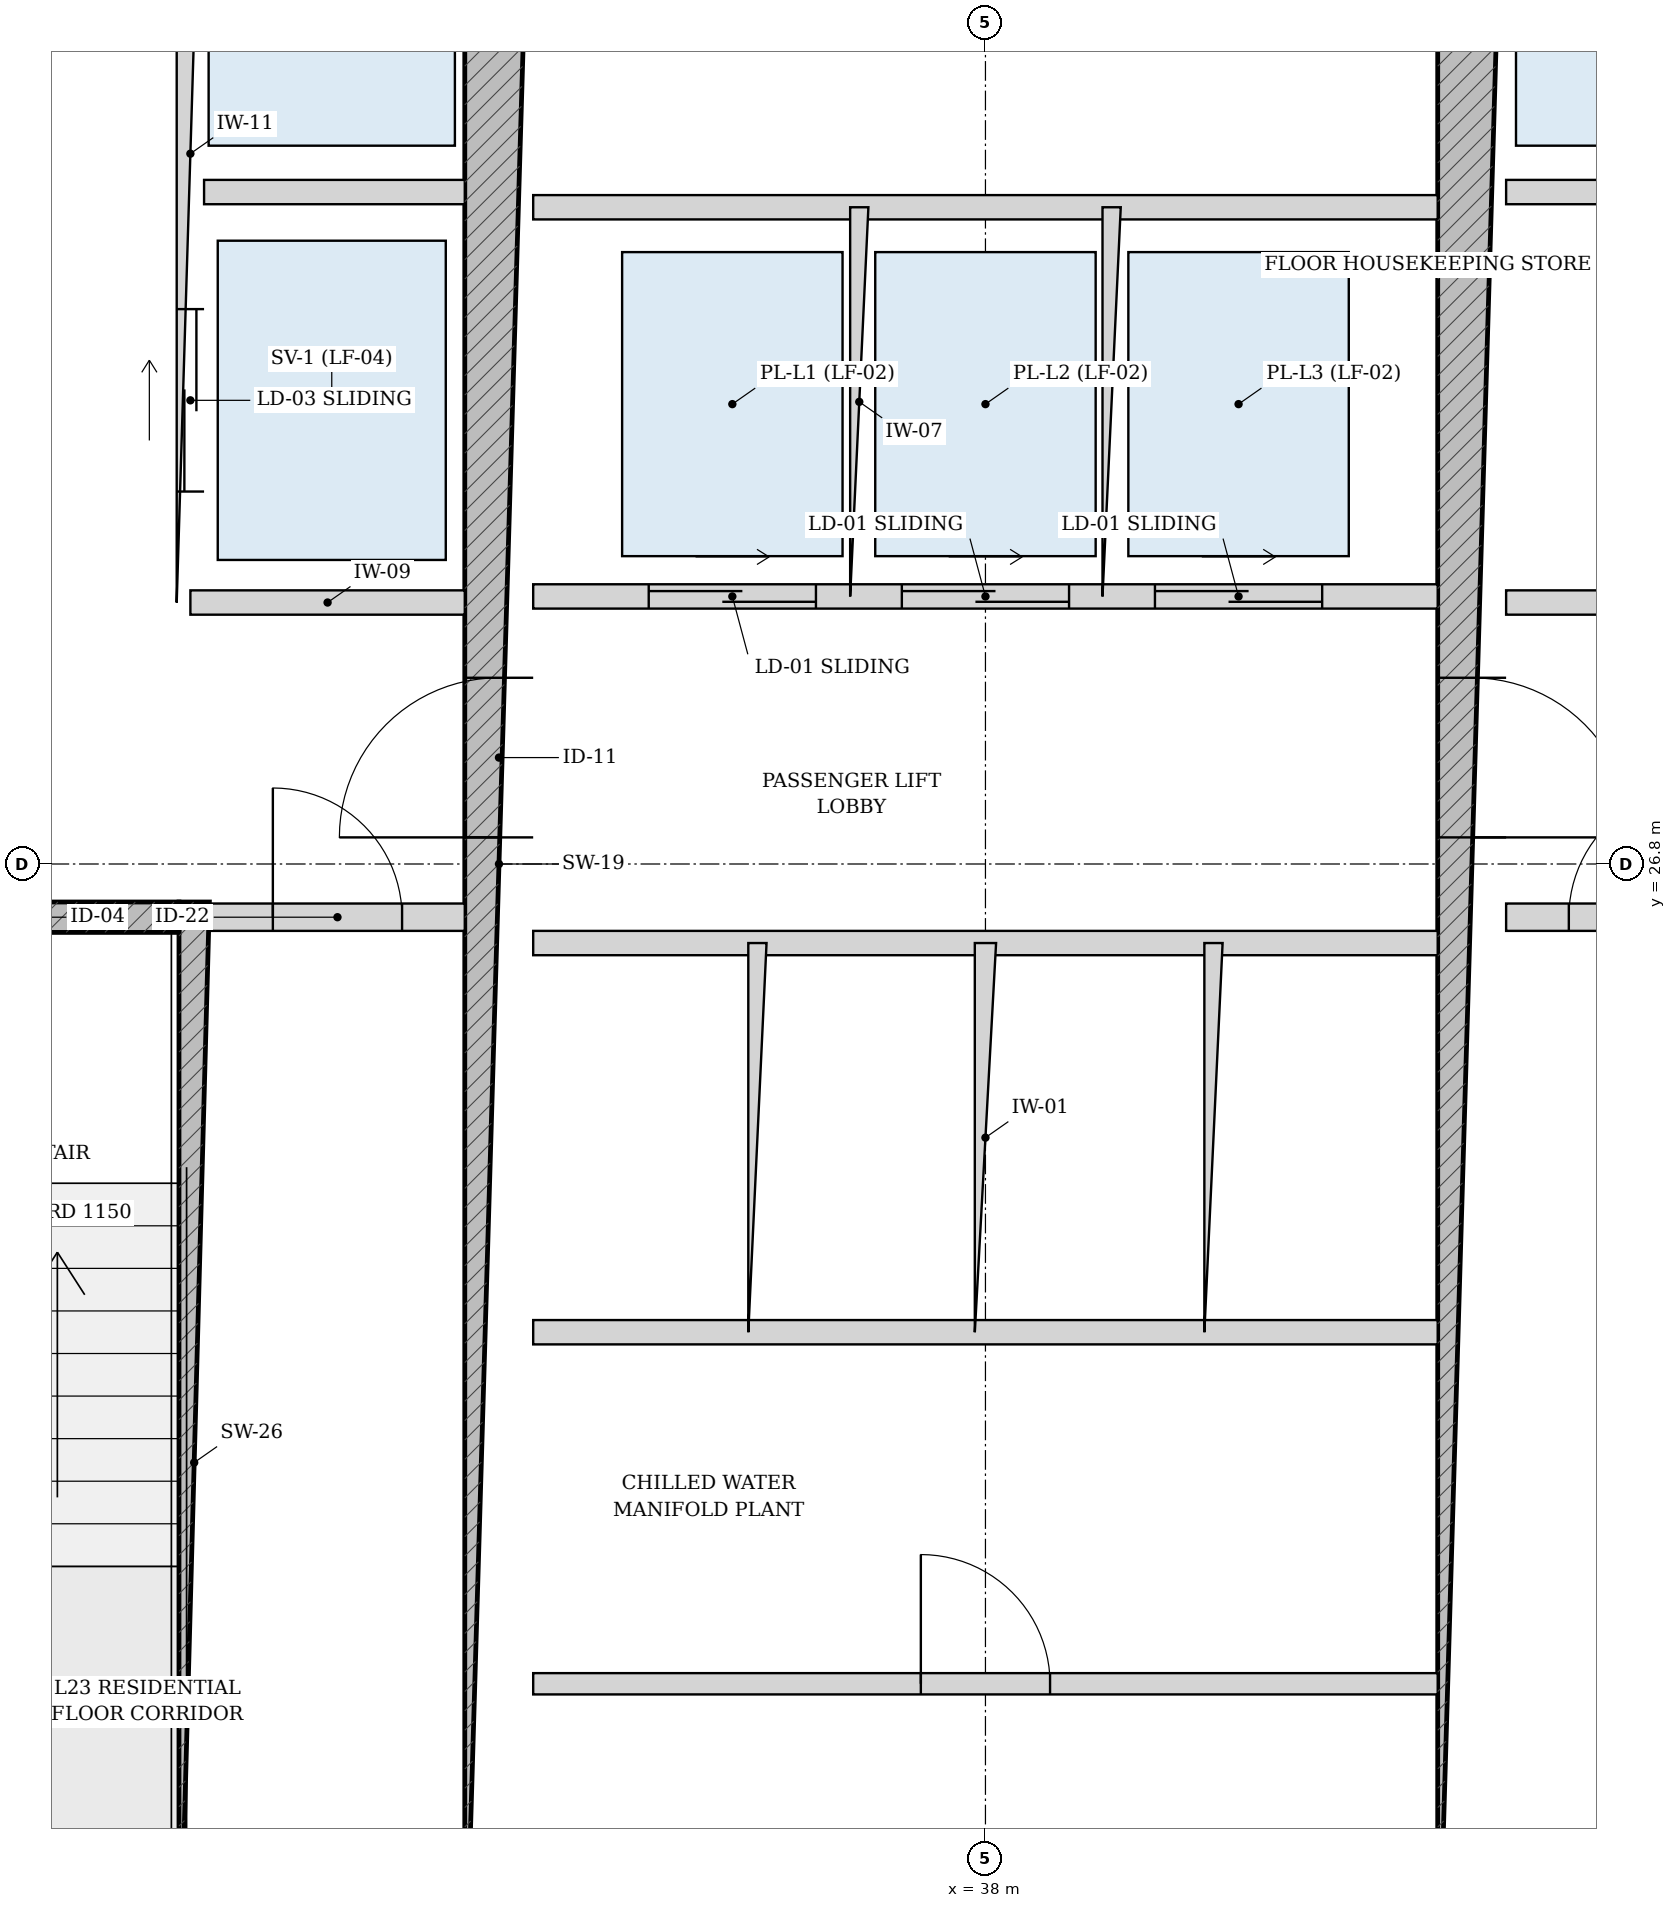
"""IFC4 building model, lengths in metres.
Left out: names, types, materials, properties, quantities, classifications, styles, units other than length and angle.
Written with IfcOpenShell. Run it as: python <this file> out.ifc"""

import sys

from ifc_helpers import new_model, si_unit, direction, frame, frame_2d, origin, place, context, subcontext, project, spatial, rectangle, extrude, source, transform, mapped, element, fill, save


model = new_model("IFC4")
c1 = context("Model", 3, precision=1e-05, world=origin(), true_north=direction((-0.2419218956, 0.970295726276)))
c2 = subcontext(c1, "Body", "Model", "MODEL_VIEW")
j1 = project(units=[si_unit("LENGTHUNIT", "METRE"), si_unit("PLANEANGLEUNIT", "RADIAN")], contexts=[c1])
p1 = place(None, origin())
s1 = spatial("IfcSite", under=j1, at=p1, CompositionType="ELEMENT")
p2 = place(p1, origin())
s2 = spatial("IfcBuilding", under=s1, at=p2, CompositionType="ELEMENT")
p3 = place(p2, frame((0.0, 0.0, 90.6)))
s3 = spatial("IfcBuildingStorey", under=s2, at=p3, CompositionType="ELEMENT", Elevation=90.6)
p4 = place(p3, frame((32.795, 19.175, 0.0), z_axis=(0.0, 0.0, 1.0), x_axis=(0.0, 1.0, 0.0)))
e1 = element("IfcWall", 1, at=p4, inside=s3, PredefinedType="SOLIDWALL", context=c2, shape_type="SweptSolid", body=[
    extrude(rectangle(XDim=7.375, YDim=0.2, at=frame_2d((3.688, 0.0))), origin(), (0.0, 0.0, 1.0), 3.325),
])
p5 = place(p3, frame((29.375, 26.45, 0.0), z_axis=(0.0, 0.0, 1.0), x_axis=(1.0, 0.0, 0.0)))
e2 = element("IfcWall", 2, at=p5, inside=s3, PredefinedType="SOLIDWALL", context=c2, shape_type="SweptSolid", body=[
    extrude(rectangle(XDim=3.32, YDim=0.2, at=frame_2d((1.66, 0.0))), origin(), (0.0, 0.0, 1.0), 3.325),
])
p6 = place(p5, frame((1.185, 0.0, 0.0)))
e3 = element("IfcOpeningElement", 3, at=p6, cuts=e2, PredefinedType="OPENING", context=c2, shape_type="SweptSolid", body=[
    extrude(rectangle(XDim=0.95, YDim=2.15, at=frame_2d((0.475, 1.075))), frame((0.0, 0.11, 0.0), z_axis=(0.0, -1.0, 0.0), x_axis=(1.0, 0.0, 0.0)), (0.0, 0.0, 1.0), 0.22),
])
p7 = place(p3, frame((34.8, 19.175, 0.0), z_axis=(0.0, 0.0, 1.0), x_axis=(0.0, 1.0, 0.0)))
e4 = element("IfcWall", 4, at=p7, inside=s3, PredefinedType="SHEAR", context=c2, shape_type="SweptSolid", body=[
    extrude(rectangle(XDim=15.25, YDim=0.45, at=frame_2d((7.625, 0.0))), origin(), (0.0, 0.0, 1.0), 3.325),
])
p8 = place(p7, frame((7.8, 0.0, 0.0)))
e5 = element("IfcOpeningElement", 5, at=p8, cuts=e4, PredefinedType="OPENING", context=c2, shape_type="SweptSolid", body=[
    extrude(rectangle(XDim=1.05, YDim=2.15, at=frame_2d((0.525, 1.075))), frame((0.0, 0.235, 0.0), z_axis=(0.0, -1.0, 0.0), x_axis=(1.0, 0.0, 0.0)), (0.0, 0.0, 1.0), 0.47),
])
p9 = place(p3, frame((41.2, 19.175, 0.0), z_axis=(0.0, 0.0, 1.0), x_axis=(0.0, 1.0, 0.0)))
e6 = element("IfcWall", 6, at=p9, inside=s3, PredefinedType="SHEAR", context=c2, shape_type="SweptSolid", body=[
    extrude(rectangle(XDim=15.25, YDim=0.45, at=frame_2d((7.625, 0.0))), origin(), (0.0, 0.0, 1.0), 3.325),
])
p10 = place(p9, frame((7.8, 0.0, 0.0)))
e7 = element("IfcOpeningElement", 7, at=p10, cuts=e6, PredefinedType="OPENING", context=c2, shape_type="SweptSolid", body=[
    extrude(rectangle(XDim=1.05, YDim=2.15, at=frame_2d((0.525, 1.075))), frame((0.0, 0.235, 0.0), z_axis=(0.0, -1.0, 0.0), x_axis=(1.0, 0.0, 0.0)), (0.0, 0.0, 1.0), 0.47),
])
p11 = place(p3, frame((32.9, 26.45, 0.0), z_axis=(0.0, 0.0, 1.0), x_axis=(1.0, 0.0, 0.0)))
e8 = element("IfcWall", 8, at=p11, inside=s3, PredefinedType="PARTITIONING", context=c2, shape_type="SweptSolid", body=[
    extrude(rectangle(XDim=1.675, YDim=0.18, at=frame_2d((0.837, 0.0))), origin(), (0.0, 0.0, 1.0), 3.325),
])
p12 = place(p11, frame((0.413, 0.0, 0.0)))
e9 = element("IfcOpeningElement", 9, at=p12, cuts=e8, PredefinedType="OPENING", context=c2, shape_type="SweptSolid", body=[
    extrude(rectangle(XDim=0.85, YDim=2.1, at=frame_2d((0.425, 1.05))), frame((0.0, 0.1, 0.0), z_axis=(0.0, -1.0, 0.0), x_axis=(1.0, 0.0, 0.0)), (0.0, 0.0, 1.0), 0.2),
])
p13 = place(p3, frame((41.425, 26.45, 0.0), z_axis=(0.0, 0.0, 1.0), x_axis=(1.0, 0.0, 0.0)))
e10 = element("IfcWall", 10, at=p13, inside=s3, PredefinedType="PARTITIONING", context=c2, shape_type="SweptSolid", body=[
    extrude(rectangle(XDim=1.675, YDim=0.18, at=frame_2d((0.837, 0.0))), origin(), (0.0, 0.0, 1.0), 3.325),
])
p14 = place(p13, frame((0.413, 0.0, 0.0)))
e11 = element("IfcOpeningElement", 11, at=p14, cuts=e10, PredefinedType="OPENING", context=c2, shape_type="SweptSolid", body=[
    extrude(rectangle(XDim=0.85, YDim=2.1, at=frame_2d((0.425, 1.05))), frame((0.0, 0.1, 0.0), z_axis=(0.0, -1.0, 0.0), x_axis=(1.0, 0.0, 0.0)), (0.0, 0.0, 1.0), 0.2),
])
p15 = place(p3, frame((32.77, 28.52, 0.0), z_axis=(0.0, 0.0, 1.0), x_axis=(0.0, 1.0, 0.0)))
e12 = element("IfcWall", 12, at=p15, inside=s3, PredefinedType="PARTITIONING", context=c2, shape_type="SweptSolid", body=[
    extrude(rectangle(XDim=5.905, YDim=0.18, at=frame_2d((2.953, 0.0))), origin(), (0.0, 0.0, 1.0), 3.325),
])
p16 = place(p15, frame((3.655, 0.0, 0.0)))
e13 = element("IfcOpeningElement", 13, at=p16, cuts=e12, PredefinedType="OPENING", context=c2, shape_type="SweptSolid", body=[
    extrude(rectangle(XDim=1.15, YDim=2.2, at=frame_2d((0.575, 1.1))), frame((0.0, 0.1, 0.0), z_axis=(0.0, -1.0, 0.0), x_axis=(1.0, 0.0, 0.0)), (0.0, 0.0, 1.0), 0.2),
])
p17 = place(p15, frame((0.73, 0.0, 0.0)))
e14 = element("IfcOpeningElement", 14, at=p17, cuts=e12, PredefinedType="OPENING", context=c2, shape_type="SweptSolid", body=[
    extrude(rectangle(XDim=1.2, YDim=2.25, at=frame_2d((0.6, 1.125))), frame((0.0, 0.1, 0.0), z_axis=(0.0, -1.0, 0.0), x_axis=(1.0, 0.0, 0.0)), (0.0, 0.0, 1.0), 0.2),
])
p18 = place(p3, frame((32.86, 31.22, 0.0), z_axis=(0.0, 0.0, 1.0), x_axis=(1.0, 0.0, 0.0)))
e15 = element("IfcWall", 15, at=p18, inside=s3, PredefinedType="PARTITIONING", context=c2, shape_type="SweptSolid", body=[
    extrude(rectangle(XDim=1.715, YDim=0.16, at=frame_2d((0.857, 0.0))), origin(), (0.0, 0.0, 1.0), 3.325),
])
p19 = place(p3, frame((32.77, 28.52, 0.0), z_axis=(0.0, 0.0, 1.0), x_axis=(1.0, 0.0, 0.0)))
e16 = element("IfcWall", 16, at=p19, inside=s3, PredefinedType="PARTITIONING", context=c2, shape_type="SweptSolid", body=[
    extrude(rectangle(XDim=1.805, YDim=0.16, at=frame_2d((0.902, 0.0))), origin(), (0.0, 0.0, 1.0), 3.325),
])
p20 = place(p3, frame((41.425, 31.22, 0.0), z_axis=(0.0, 0.0, 1.0), x_axis=(1.0, 0.0, 0.0)))
e17 = element("IfcWall", 17, at=p20, inside=s3, PredefinedType="PARTITIONING", context=c2, shape_type="SweptSolid", body=[
    extrude(rectangle(XDim=1.715, YDim=0.16, at=frame_2d((0.857, 0.0))), origin(), (0.0, 0.0, 1.0), 3.325),
])
p21 = place(p3, frame((41.425, 28.52, 0.0), z_axis=(0.0, 0.0, 1.0), x_axis=(1.0, 0.0, 0.0)))
e18 = element("IfcWall", 18, at=p21, inside=s3, PredefinedType="PARTITIONING", context=c2, shape_type="SweptSolid", body=[
    extrude(rectangle(XDim=1.805, YDim=0.16, at=frame_2d((0.902, 0.0))), origin(), (0.0, 0.0, 1.0), 3.325),
])
p22 = place(p3, frame((35.025, 28.56, 0.0), z_axis=(0.0, 0.0, 1.0), x_axis=(1.0, 0.0, 0.0)))
e19 = element("IfcWall", 19, at=p22, inside=s3, PredefinedType="PARTITIONING", context=c2, shape_type="SweptSolid", body=[
    extrude(rectangle(XDim=5.95, YDim=0.16, at=frame_2d((2.975, 0.0))), origin(), (0.0, 0.0, 1.0), 3.325),
])
p23 = place(p22, frame((0.76, 0.0, 0.0)))
e20 = element("IfcOpeningElement", 20, at=p23, cuts=e19, PredefinedType="OPENING", context=c2, shape_type="SweptSolid", body=[
    extrude(rectangle(XDim=1.1, YDim=2.2, at=frame_2d((0.55, 1.1))), frame((0.0, 0.09, 0.0), z_axis=(0.0, -1.0, 0.0), x_axis=(1.0, 0.0, 0.0)), (0.0, 0.0, 1.0), 0.18),
])
p24 = place(p22, frame((2.425, 0.0, 0.0)))
e21 = element("IfcOpeningElement", 21, at=p24, cuts=e19, PredefinedType="OPENING", context=c2, shape_type="SweptSolid", body=[
    extrude(rectangle(XDim=1.1, YDim=2.2, at=frame_2d((0.55, 1.1))), frame((0.0, 0.09, 0.0), z_axis=(0.0, -1.0, 0.0), x_axis=(1.0, 0.0, 0.0)), (0.0, 0.0, 1.0), 0.18),
])
p25 = place(p22, frame((4.09, 0.0, 0.0)))
e22 = element("IfcOpeningElement", 22, at=p25, cuts=e19, PredefinedType="OPENING", context=c2, shape_type="SweptSolid", body=[
    extrude(rectangle(XDim=1.1, YDim=2.2, at=frame_2d((0.55, 1.1))), frame((0.0, 0.09, 0.0), z_axis=(0.0, -1.0, 0.0), x_axis=(1.0, 0.0, 0.0)), (0.0, 0.0, 1.0), 0.18),
])
p26 = place(p3, frame((35.025, 31.12, 0.0), z_axis=(0.0, 0.0, 1.0), x_axis=(1.0, 0.0, 0.0)))
e23 = element("IfcWall", 23, at=p26, inside=s3, PredefinedType="PARTITIONING", context=c2, shape_type="SweptSolid", body=[
    extrude(rectangle(XDim=5.95, YDim=0.16, at=frame_2d((2.975, 0.0))), origin(), (0.0, 0.0, 1.0), 3.325),
])
for number, where, z_axis, x_axis in (
    (24, (37.17, 28.56, 0.0), (0.0, 0.0, 1.0), (0.0, 1.0, 0.0)),
    (25, (38.83, 28.56, 0.0), (0.0, 0.0, 1.0), (0.0, 1.0, 0.0)),
):
    element("IfcWall", number, at=place(p3, frame(where, z_axis=z_axis, x_axis=x_axis)), inside=s3, PredefinedType="PARTITIONING", context=c2, shape_type="SweptSolid", body=[
        extrude(rectangle(XDim=2.56, YDim=0.12, at=frame_2d((1.28, 0.0))), origin(), (0.0, 0.0, 1.0), 3.325),
    ])
for number, where, z_axis, x_axis in (
    (26, (35.025, 26.28, 0.0), (0.0, 0.0, 1.0), (1.0, 0.0, 0.0)),
    (27, (35.025, 23.72, 0.0), (0.0, 0.0, 1.0), (1.0, 0.0, 0.0)),
):
    element("IfcWall", number, at=place(p3, frame(where, z_axis=z_axis, x_axis=x_axis)), inside=s3, PredefinedType="PARTITIONING", context=c2, shape_type="SweptSolid", body=[
        extrude(rectangle(XDim=5.95, YDim=0.16, at=frame_2d((2.975, 0.0))), origin(), (0.0, 0.0, 1.0), 3.325),
    ])
p27 = place(p3, frame((36.5, 23.72, 0.0), z_axis=(0.0, 0.0, 1.0), x_axis=(0.0, 1.0, 0.0)))
e28 = element("IfcWall", 28, at=p27, inside=s3, PredefinedType="PARTITIONING", context=c2, shape_type="SweptSolid", body=[
    extrude(rectangle(XDim=2.56, YDim=0.12, at=frame_2d((1.28, 0.0))), origin(), (0.0, 0.0, 1.0), 3.325),
])
p28 = place(p3, frame((38.0, 23.72, 0.0), z_axis=(0.0, 0.0, 1.0), x_axis=(0.0, 1.0, 0.0)))
e29 = element("IfcWall", 29, at=p28, inside=s3, PredefinedType="PARTITIONING", context=c2, shape_type="SweptSolid", body=[
    extrude(rectangle(XDim=2.56, YDim=0.14, at=frame_2d((1.28, 0.0))), origin(), (0.0, 0.0, 1.0), 3.325),
])
p29 = place(p3, frame((39.5, 23.72, 0.0), z_axis=(0.0, 0.0, 1.0), x_axis=(0.0, 1.0, 0.0)))
e30 = element("IfcWall", 30, at=p29, inside=s3, PredefinedType="PARTITIONING", context=c2, shape_type="SweptSolid", body=[
    extrude(rectangle(XDim=2.56, YDim=0.12, at=frame_2d((1.28, 0.0))), origin(), (0.0, 0.0, 1.0), 3.325),
])
p30 = place(p3, frame((35.025, 21.407, 0.0), z_axis=(0.0, 0.0, 1.0), x_axis=(1.0, 0.0, 0.0)))
e31 = element("IfcWall", 31, at=p30, inside=s3, PredefinedType="PARTITIONING", context=c2, shape_type="SweptSolid", body=[
    extrude(rectangle(XDim=5.95, YDim=0.14, at=frame_2d((2.975, 0.0))), origin(), (0.0, 0.0, 1.0), 3.325),
])
p31 = place(p30, frame((2.55, 0.0, 0.0)))
e32 = element("IfcOpeningElement", 32, at=p31, cuts=e31, PredefinedType="OPENING", context=c2, shape_type="SweptSolid", body=[
    extrude(rectangle(XDim=0.85, YDim=2.1, at=frame_2d((0.425, 1.05))), frame((0.0, 0.08, 0.0), z_axis=(0.0, -1.0, 0.0), x_axis=(1.0, 0.0, 0.0)), (0.0, 0.0, 1.0), 0.16),
])
m1 = source(origin(), c2, "Body", "SweptSolid", [
    extrude(rectangle(XDim=1.05, YDim=2.15, at=frame_2d((0.525, 1.075))), frame((0.0, 0.025, 0.0), z_axis=(0.0, -1.0, 0.0), x_axis=(1.0, 0.0, 0.0)), (0.0, 0.0, 1.0), 0.05),
])
p32 = place(p8, origin())
e33 = element("IfcDoor", 33, at=p32, inside=s3, OperationType="SINGLE_SWING_LEFT", PredefinedType="DOOR", context=c2, shape_type="MappedRepresentation", body=[
    mapped(m1, transform((0.0, 0.0, 0.0), scale=1.0)),
])
fill(e5, e33)
p33 = place(p10, frame((1.05, 0.0, 0.0), z_axis=(0.0, 0.0, 1.0), x_axis=(-1.0, 0.0, 0.0)))
e34 = element("IfcDoor", 34, at=p33, inside=s3, OperationType="SINGLE_SWING_RIGHT", PredefinedType="DOOR", context=c2, shape_type="MappedRepresentation", body=[
    mapped(m1, transform((0.0, 0.0, 0.0), scale=1.0)),
])
fill(e7, e34)
m2 = source(origin(), c2, "Body", "SweptSolid", [
    extrude(rectangle(XDim=0.85, YDim=2.1, at=frame_2d((0.425, 1.05))), frame((0.0, 0.025, 0.0), z_axis=(0.0, -1.0, 0.0), x_axis=(1.0, 0.0, 0.0)), (0.0, 0.0, 1.0), 0.05),
])
p34 = place(p12, origin())
e35 = element("IfcDoor", 35, at=p34, inside=s3, OperationType="SINGLE_SWING_LEFT", PredefinedType="DOOR", context=c2, shape_type="MappedRepresentation", body=[
    mapped(m2, transform((0.0, 0.0, 0.0), scale=1.0)),
])
fill(e9, e35)
p35 = place(p14, origin())
e36 = element("IfcDoor", 36, at=p35, inside=s3, OperationType="SINGLE_SWING_RIGHT", PredefinedType="DOOR", context=c2, shape_type="MappedRepresentation", body=[
    mapped(m2, transform((0.0, 0.0, 0.0), scale=1.0)),
])
fill(e11, e36)
p36 = place(p31, origin())
e37 = element("IfcDoor", 37, at=p36, inside=s3, OperationType="SINGLE_SWING_LEFT", PredefinedType="DOOR", context=c2, shape_type="MappedRepresentation", body=[
    mapped(m2, transform((0.0, 0.0, 0.0), scale=1.0)),
])
fill(e32, e37)
m3 = source(origin(), c2, "Body", "SweptSolid", [
    extrude(rectangle(XDim=1.2, YDim=2.25, at=frame_2d((0.6, 1.125))), frame((0.0, 0.025, 0.0), z_axis=(0.0, -1.0, 0.0), x_axis=(1.0, 0.0, 0.0)), (0.0, 0.0, 1.0), 0.05),
])
p37 = place(p17, origin())
e38 = element("IfcDoor", 38, at=p37, inside=s3, OperationType="DOUBLE_DOOR_SLIDING", PredefinedType="DOOR", context=c2, shape_type="MappedRepresentation", body=[
    mapped(m3, transform((0.0, 0.0, 0.0), scale=1.0)),
])
fill(e14, e38)
m4 = source(origin(), c2, "Body", "SweptSolid", [
    extrude(rectangle(XDim=1.1, YDim=2.2, at=frame_2d((0.55, 1.1))), frame((0.0, 0.025, 0.0), z_axis=(0.0, -1.0, 0.0), x_axis=(1.0, 0.0, 0.0)), (0.0, 0.0, 1.0), 0.05),
])
p38 = place(p23, origin())
e39 = element("IfcDoor", 39, at=p38, inside=s3, OperationType="DOUBLE_DOOR_SLIDING", PredefinedType="DOOR", context=c2, shape_type="MappedRepresentation", body=[
    mapped(m4, transform((0.0, 0.0, 0.0), scale=1.0)),
])
fill(e20, e39)
p39 = place(p24, origin())
e40 = element("IfcDoor", 40, at=p39, inside=s3, OperationType="DOUBLE_DOOR_SLIDING", PredefinedType="DOOR", context=c2, shape_type="MappedRepresentation", body=[
    mapped(m4, transform((0.0, 0.0, 0.0), scale=1.0)),
])
fill(e21, e40)
p40 = place(p25, origin())
e41 = element("IfcDoor", 41, at=p40, inside=s3, OperationType="DOUBLE_DOOR_SLIDING", PredefinedType="DOOR", context=c2, shape_type="MappedRepresentation", body=[
    mapped(m4, transform((0.0, 0.0, 0.0), scale=1.0)),
])
fill(e22, e41)
save(model, sys.argv[1])
